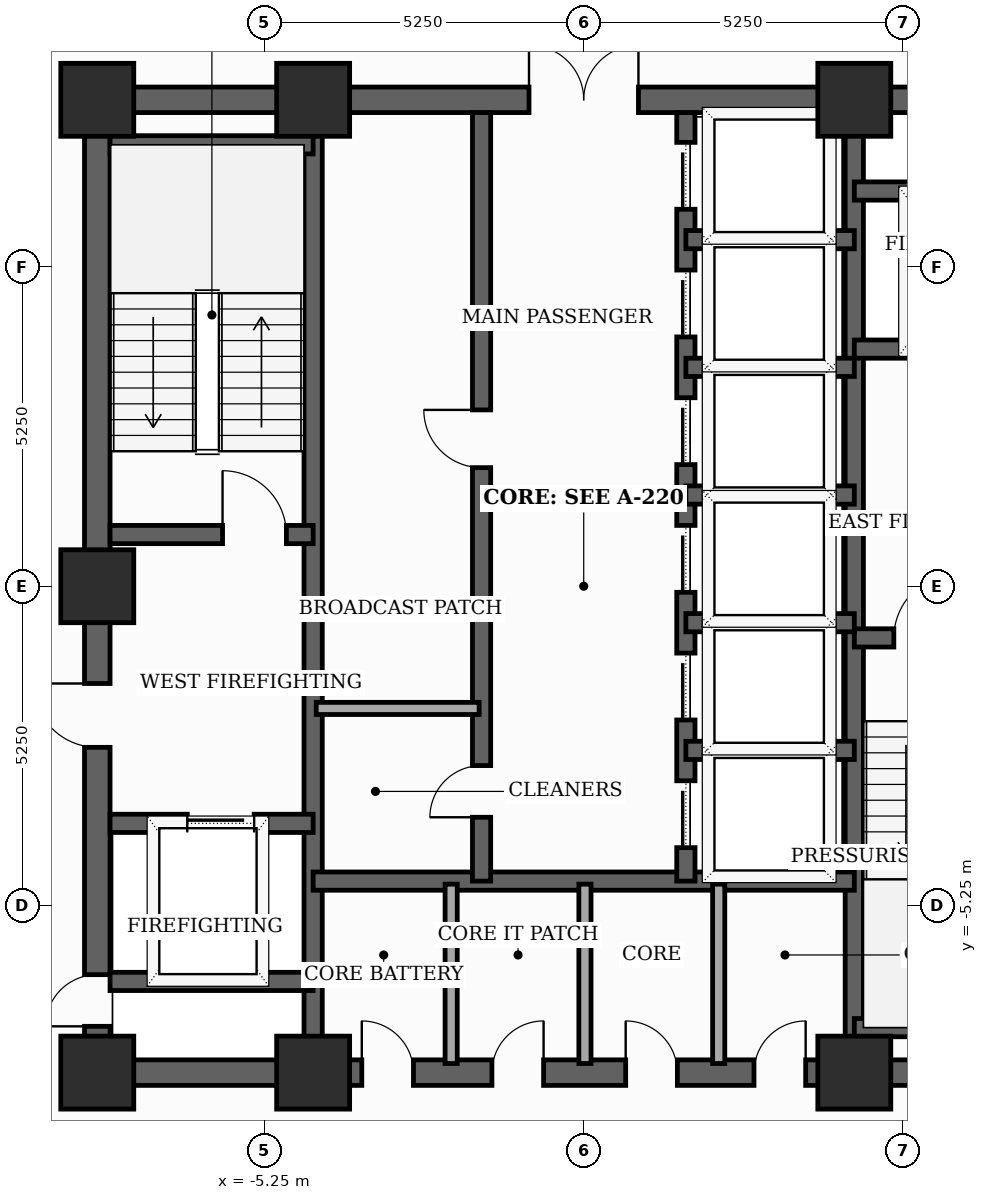
"""IFC4 building model, lengths in metres.
Left out: names, types, materials, properties, quantities, classifications, styles, units other than length and angle.
Written with IfcOpenShell. Run it as: python <this file> out.ifc"""

import sys

from ifc_helpers import new_model, si_unit, direction, frame, frame_2d, origin, origin_2d, place, context, subcontext, project, spatial, rectangle, extrude, element, fill, save


model = new_model("IFC4")
c1 = context("Model", 3, precision=1e-05, world=origin(), true_north=direction((0.0, 1.0)))
c2 = subcontext(c1, "Body", "Model", "MODEL_VIEW")
j1 = project(units=[si_unit("LENGTHUNIT", "METRE"), si_unit("PLANEANGLEUNIT", "RADIAN")], contexts=[c1])
p1 = place(None, origin())
s1 = spatial("IfcSite", under=j1, at=p1, CompositionType="ELEMENT")
p2 = place(p1, origin())
s2 = spatial("IfcBuilding", under=s1, at=p2, CompositionType="ELEMENT")
p3 = place(p2, frame((0.0, 0.0, 206.4)))
s3 = spatial("IfcBuildingStorey", under=s2, at=p3, CompositionType="ELEMENT", Elevation=206.4)
for number, where, z_axis, x_axis in (
    (1, (-8.0, -8.0, 0.0), (0.0, 0.0, 1.0), (1.0, 0.0, 0.0)),
    (2, (-4.45, -8.0, 0.0), (0.0, 0.0, 1.0), (1.0, 0.0, 0.0)),
    (3, (4.45, -8.0, 0.0), (0.0, 0.0, 1.0), (1.0, 0.0, 0.0)),
    (4, (4.45, 8.0, 0.0), (0.0, 0.0, 1.0), (1.0, 0.0, 0.0)),
    (5, (-4.45, 8.0, 0.0), (0.0, 0.0, 1.0), (1.0, 0.0, 0.0)),
    (6, (-8.0, 8.0, 0.0), (0.0, 0.0, 1.0), (1.0, 0.0, 0.0)),
    (7, (-8.0, 0.0, 0.0), (0.0, 0.0, 1.0), (1.0, 0.0, 0.0)),
):
    element("IfcColumn", number, at=place(p3, frame(where, z_axis=z_axis, x_axis=x_axis)), inside=s3, PredefinedType="COLUMN", context=c2, shape_type="SweptSolid", body=[
        extrude(rectangle(XDim=1.2, YDim=1.2, at=origin_2d()), origin(), (0.0, 0.0, 1.0), 3.7),
    ])
p4 = place(p3, frame((-8.0, -8.0, 0.0), z_axis=(0.0, 0.0, 1.0), x_axis=(0.0, 1.0, 0.0)))
e8 = element("IfcWall", 8, at=p4, inside=s3, PredefinedType="SHEAR", context=c2, shape_type="SweptSolid", body=[
    extrude(rectangle(XDim=16.0, YDim=0.42, at=frame_2d((8.0, 0.0))), origin(), (0.0, 0.0, 1.0), 3.5),
])
p5 = place(p4, frame((0.761, 0.0, 0.0)))
e9 = element("IfcOpeningElement", 9, at=p5, cuts=e8, PredefinedType="OPENING", context=c2, shape_type="SweptSolid", body=[
    extrude(rectangle(XDim=0.85, YDim=2.02, at=frame_2d((0.425, 1.01))), frame((0.0, 0.22, 0.0), z_axis=(0.0, -1.0, 0.0), x_axis=(1.0, 0.0, 0.0)), (0.0, 0.0, 1.0), 0.44),
])
p6 = place(p4, frame((5.35, 0.0, 0.0)))
e10 = element("IfcOpeningElement", 10, at=p6, cuts=e8, PredefinedType="OPENING", context=c2, shape_type="SweptSolid", body=[
    extrude(rectangle(XDim=1.05, YDim=2.15, at=frame_2d((0.525, 1.075))), frame((0.0, 0.22, 0.0), z_axis=(0.0, -1.0, 0.0), x_axis=(1.0, 0.0, 0.0)), (0.0, 0.0, 1.0), 0.44),
])
p7 = place(p3, frame((-8.0, -8.0, 0.0), z_axis=(0.0, 0.0, 1.0), x_axis=(1.0, 0.0, 0.0)))
e11 = element("IfcWall", 11, at=p7, inside=s3, PredefinedType="SHEAR", context=c2, shape_type="SweptSolid", body=[
    extrude(rectangle(XDim=16.0, YDim=0.42, at=frame_2d((8.0, 0.0))), origin(), (0.0, 0.0, 1.0), 3.5),
])
p8 = place(p7, frame((4.35, 0.0, 0.0)))
e12 = element("IfcOpeningElement", 12, at=p8, cuts=e11, PredefinedType="OPENING", context=c2, shape_type="SweptSolid", body=[
    extrude(rectangle(XDim=0.85, YDim=2.02, at=frame_2d((0.425, 1.01))), frame((0.0, 0.22, 0.0), z_axis=(0.0, -1.0, 0.0), x_axis=(1.0, 0.0, 0.0)), (0.0, 0.0, 1.0), 0.44),
])
p9 = place(p7, frame((6.49, 0.0, 0.0)))
e13 = element("IfcOpeningElement", 13, at=p9, cuts=e11, PredefinedType="OPENING", context=c2, shape_type="SweptSolid", body=[
    extrude(rectangle(XDim=0.85, YDim=2.02, at=frame_2d((0.425, 1.01))), frame((0.0, 0.22, 0.0), z_axis=(0.0, -1.0, 0.0), x_axis=(1.0, 0.0, 0.0)), (0.0, 0.0, 1.0), 0.44),
])
p10 = place(p7, frame((8.69, 0.0, 0.0)))
e14 = element("IfcOpeningElement", 14, at=p10, cuts=e11, PredefinedType="OPENING", context=c2, shape_type="SweptSolid", body=[
    extrude(rectangle(XDim=0.85, YDim=2.02, at=frame_2d((0.425, 1.01))), frame((0.0, 0.22, 0.0), z_axis=(0.0, -1.0, 0.0), x_axis=(1.0, 0.0, 0.0)), (0.0, 0.0, 1.0), 0.44),
])
p11 = place(p7, frame((10.8, 0.0, 0.0)))
e15 = element("IfcOpeningElement", 15, at=p11, cuts=e11, PredefinedType="OPENING", context=c2, shape_type="SweptSolid", body=[
    extrude(rectangle(XDim=0.85, YDim=2.02, at=frame_2d((0.425, 1.01))), frame((0.0, 0.22, 0.0), z_axis=(0.0, -1.0, 0.0), x_axis=(1.0, 0.0, 0.0)), (0.0, 0.0, 1.0), 0.44),
])
p12 = place(p3, frame((-8.0, 8.0, 0.0), z_axis=(0.0, 0.0, 1.0), x_axis=(1.0, 0.0, 0.0)))
e16 = element("IfcWall", 16, at=p12, inside=s3, PredefinedType="SHEAR", context=c2, shape_type="SweptSolid", body=[
    extrude(rectangle(XDim=16.0, YDim=0.42, at=frame_2d((8.0, 0.0))), origin(), (0.0, 0.0, 1.0), 3.5),
])
p13 = place(p12, frame((7.1, 0.0, 0.0)))
e17 = element("IfcOpeningElement", 17, at=p13, cuts=e16, PredefinedType="OPENING", context=c2, shape_type="SweptSolid", body=[
    extrude(rectangle(XDim=1.8, YDim=2.15, at=frame_2d((0.9, 1.075))), frame((0.0, 0.22, 0.0), z_axis=(0.0, -1.0, 0.0), x_axis=(1.0, 0.0, 0.0)), (0.0, 0.0, 1.0), 0.44),
])
for number, where, z_axis, x_axis in (
    (18, (-4.45, -7.79, 0.0), (0.0, 0.0, 1.0), (0.0, 1.0, 0.0)),
    (19, (4.45, -7.79, 0.0), (0.0, 0.0, 1.0), (0.0, 1.0, 0.0)),
):
    element("IfcWall", number, at=place(p3, frame(where, z_axis=z_axis, x_axis=x_axis)), inside=s3, PredefinedType="SHEAR", context=c2, shape_type="SweptSolid", body=[
        extrude(rectangle(XDim=15.58, YDim=0.3, at=frame_2d((7.79, 0.0))), origin(), (0.0, 0.0, 1.0), 3.5),
    ])
p14 = place(p3, frame((-7.79, 0.85, 0.0), z_axis=(0.0, 0.0, 1.0), x_axis=(1.0, 0.0, 0.0)))
e20 = element("IfcWall", 20, at=p14, inside=s3, PredefinedType="SHEAR", context=c2, shape_type="SweptSolid", body=[
    extrude(rectangle(XDim=3.34, YDim=0.3, at=frame_2d((1.67, 0.0))), origin(), (0.0, 0.0, 1.0), 3.5),
])
p15 = place(p14, frame((1.85, 0.0, 0.0)))
e21 = element("IfcOpeningElement", 21, at=p15, cuts=e20, PredefinedType="OPENING", context=c2, shape_type="SweptSolid", body=[
    extrude(rectangle(XDim=1.05, YDim=2.15, at=frame_2d((0.525, 1.075))), frame((0.0, 0.16, 0.0), z_axis=(0.0, -1.0, 0.0), x_axis=(1.0, 0.0, 0.0)), (0.0, 0.0, 1.0), 0.32),
])
p16 = place(p3, frame((-7.79, 7.26, 0.0), z_axis=(0.0, 0.0, 1.0), x_axis=(1.0, 0.0, 0.0)))
e22 = element("IfcWall", 22, at=p16, inside=s3, PredefinedType="SHEAR", context=c2, shape_type="SweptSolid", body=[
    extrude(rectangle(XDim=3.34, YDim=0.3, at=frame_2d((1.67, 0.0))), origin(), (0.0, 0.0, 1.0), 3.5),
])
p17 = place(p3, frame((4.45, -0.85, 0.0), z_axis=(0.0, 0.0, 1.0), x_axis=(1.0, 0.0, 0.0)))
e23 = element("IfcWall", 23, at=p17, inside=s3, PredefinedType="SHEAR", context=c2, shape_type="SweptSolid", body=[
    extrude(rectangle(XDim=3.34, YDim=0.3, at=frame_2d((1.67, 0.0))), origin(), (0.0, 0.0, 1.0), 3.5),
])
p18 = place(p17, frame((0.65, 0.0, 0.0)))
e24 = element("IfcOpeningElement", 24, at=p18, cuts=e23, PredefinedType="OPENING", context=c2, shape_type="SweptSolid", body=[
    extrude(rectangle(XDim=1.05, YDim=2.15, at=frame_2d((0.525, 1.075))), frame((0.0, 0.16, 0.0), z_axis=(0.0, -1.0, 0.0), x_axis=(1.0, 0.0, 0.0)), (0.0, 0.0, 1.0), 0.32),
])
p19 = place(p3, frame((4.45, -7.26, 0.0), z_axis=(0.0, 0.0, 1.0), x_axis=(1.0, 0.0, 0.0)))
e25 = element("IfcWall", 25, at=p19, inside=s3, PredefinedType="SHEAR", context=c2, shape_type="SweptSolid", body=[
    extrude(rectangle(XDim=3.55, YDim=0.3, at=frame_2d((1.775, 0.0))), origin(), (0.0, 0.0, 1.0), 3.5),
])
p20 = place(p3, frame((-7.79, -3.9, 0.0), z_axis=(0.0, 0.0, 1.0), x_axis=(1.0, 0.0, 0.0)))
e26 = element("IfcWall", 26, at=p20, inside=s3, PredefinedType="SHEAR", context=c2, shape_type="SweptSolid", body=[
    extrude(rectangle(XDim=3.34, YDim=0.3, at=frame_2d((1.67, 0.0))), origin(), (0.0, 0.0, 1.0), 3.5),
])
p21 = place(p20, frame((1.27, 0.0, 0.0)))
e27 = element("IfcOpeningElement", 27, at=p21, cuts=e26, PredefinedType="OPENING", context=c2, shape_type="SweptSolid", body=[
    extrude(rectangle(XDim=1.1, YDim=2.1, at=frame_2d((0.55, 1.05))), frame((0.0, 0.16, 0.0), z_axis=(0.0, -1.0, 0.0), x_axis=(1.0, 0.0, 0.0)), (0.0, 0.0, 1.0), 0.32),
])
p22 = place(p3, frame((-7.79, -6.5, 0.0), z_axis=(0.0, 0.0, 1.0), x_axis=(1.0, 0.0, 0.0)))
e28 = element("IfcWall", 28, at=p22, inside=s3, PredefinedType="SHEAR", context=c2, shape_type="SweptSolid", body=[
    extrude(rectangle(XDim=3.34, YDim=0.3, at=frame_2d((1.67, 0.0))), origin(), (0.0, 0.0, 1.0), 3.5),
])
p23 = place(p3, frame((4.45, 3.9, 0.0), z_axis=(0.0, 0.0, 1.0), x_axis=(1.0, 0.0, 0.0)))
e29 = element("IfcWall", 29, at=p23, inside=s3, PredefinedType="SHEAR", context=c2, shape_type="SweptSolid", body=[
    extrude(rectangle(XDim=3.34, YDim=0.3, at=frame_2d((1.67, 0.0))), origin(), (0.0, 0.0, 1.0), 3.5),
])
p24 = place(p23, frame((1.18, 0.0, 0.0)))
e30 = element("IfcOpeningElement", 30, at=p24, cuts=e29, PredefinedType="OPENING", context=c2, shape_type="SweptSolid", body=[
    extrude(rectangle(XDim=1.1, YDim=2.1, at=frame_2d((0.55, 1.05))), frame((0.0, 0.16, 0.0), z_axis=(0.0, -1.0, 0.0), x_axis=(1.0, 0.0, 0.0)), (0.0, 0.0, 1.0), 0.32),
])
p25 = place(p3, frame((4.45, 6.5, 0.0), z_axis=(0.0, 0.0, 1.0), x_axis=(1.0, 0.0, 0.0)))
e31 = element("IfcWall", 31, at=p25, inside=s3, PredefinedType="SHEAR", context=c2, shape_type="SweptSolid", body=[
    extrude(rectangle(XDim=3.34, YDim=0.3, at=frame_2d((1.67, 0.0))), origin(), (0.0, 0.0, 1.0), 3.5),
])
p26 = place(p3, frame((-4.45, -4.85, 0.0), z_axis=(0.0, 0.0, 1.0), x_axis=(1.0, 0.0, 0.0)))
e32 = element("IfcWall", 32, at=p26, inside=s3, PredefinedType="SHEAR", context=c2, shape_type="SweptSolid", body=[
    extrude(rectangle(XDim=8.9, YDim=0.3, at=frame_2d((4.45, 0.0))), origin(), (0.0, 0.0, 1.0), 3.5),
])
p27 = place(p3, frame((-1.68, -4.85, 0.0), z_axis=(0.0, 0.0, 1.0), x_axis=(0.0, 1.0, 0.0)))
e33 = element("IfcWall", 33, at=p27, inside=s3, PredefinedType="SHEAR", context=c2, shape_type="SweptSolid", body=[
    extrude(rectangle(XDim=12.64, YDim=0.3, at=frame_2d((6.32, 0.0))), origin(), (0.0, 0.0, 1.0), 3.5),
])
p28 = place(p27, frame((1.05, 0.0, 0.0)))
e34 = element("IfcOpeningElement", 34, at=p28, cuts=e33, PredefinedType="OPENING", context=c2, shape_type="SweptSolid", body=[
    extrude(rectangle(XDim=0.85, YDim=2.02, at=frame_2d((0.425, 1.01))), frame((0.0, 0.16, 0.0), z_axis=(0.0, -1.0, 0.0), x_axis=(1.0, 0.0, 0.0)), (0.0, 0.0, 1.0), 0.32),
])
p29 = place(p27, frame((6.8, 0.0, 0.0)))
e35 = element("IfcOpeningElement", 35, at=p29, cuts=e33, PredefinedType="OPENING", context=c2, shape_type="SweptSolid", body=[
    extrude(rectangle(XDim=0.95, YDim=2.1, at=frame_2d((0.475, 1.05))), frame((0.0, 0.16, 0.0), z_axis=(0.0, -1.0, 0.0), x_axis=(1.0, 0.0, 0.0)), (0.0, 0.0, 1.0), 0.32),
])
p30 = place(p3, frame((1.68, -4.85, 0.0), z_axis=(0.0, 0.0, 1.0), x_axis=(0.0, 1.0, 0.0)))
e36 = element("IfcWall", 36, at=p30, inside=s3, PredefinedType="SHEAR", context=c2, shape_type="SweptSolid", body=[
    extrude(rectangle(XDim=12.64, YDim=0.3, at=frame_2d((6.32, 0.0))), origin(), (0.0, 0.0, 1.0), 3.5),
])
p31 = place(p30, frame((0.55, 0.0, 0.0)))
e37 = element("IfcOpeningElement", 37, at=p31, cuts=e36, PredefinedType="OPENING", context=c2, shape_type="SweptSolid", body=[
    extrude(rectangle(XDim=1.1, YDim=2.1, at=frame_2d((0.55, 1.05))), frame((0.0, 0.16, 0.0), z_axis=(0.0, -1.0, 0.0), x_axis=(1.0, 0.0, 0.0)), (0.0, 0.0, 1.0), 0.32),
])
p32 = place(p30, frame((2.65, 0.0, 0.0)))
e38 = element("IfcOpeningElement", 38, at=p32, cuts=e36, PredefinedType="OPENING", context=c2, shape_type="SweptSolid", body=[
    extrude(rectangle(XDim=1.1, YDim=2.1, at=frame_2d((0.55, 1.05))), frame((0.0, 0.16, 0.0), z_axis=(0.0, -1.0, 0.0), x_axis=(1.0, 0.0, 0.0)), (0.0, 0.0, 1.0), 0.32),
])
p33 = place(p30, frame((4.75, 0.0, 0.0)))
e39 = element("IfcOpeningElement", 39, at=p33, cuts=e36, PredefinedType="OPENING", context=c2, shape_type="SweptSolid", body=[
    extrude(rectangle(XDim=1.1, YDim=2.1, at=frame_2d((0.55, 1.05))), frame((0.0, 0.16, 0.0), z_axis=(0.0, -1.0, 0.0), x_axis=(1.0, 0.0, 0.0)), (0.0, 0.0, 1.0), 0.32),
])
p34 = place(p30, frame((6.85, 0.0, 0.0)))
e40 = element("IfcOpeningElement", 40, at=p34, cuts=e36, PredefinedType="OPENING", context=c2, shape_type="SweptSolid", body=[
    extrude(rectangle(XDim=1.1, YDim=2.1, at=frame_2d((0.55, 1.05))), frame((0.0, 0.16, 0.0), z_axis=(0.0, -1.0, 0.0), x_axis=(1.0, 0.0, 0.0)), (0.0, 0.0, 1.0), 0.32),
])
p35 = place(p30, frame((8.95, 0.0, 0.0)))
e41 = element("IfcOpeningElement", 41, at=p35, cuts=e36, PredefinedType="OPENING", context=c2, shape_type="SweptSolid", body=[
    extrude(rectangle(XDim=1.1, YDim=2.1, at=frame_2d((0.55, 1.05))), frame((0.0, 0.16, 0.0), z_axis=(0.0, -1.0, 0.0), x_axis=(1.0, 0.0, 0.0)), (0.0, 0.0, 1.0), 0.32),
])
p36 = place(p30, frame((11.05, 0.0, 0.0)))
e42 = element("IfcOpeningElement", 42, at=p36, cuts=e36, PredefinedType="OPENING", context=c2, shape_type="SweptSolid", body=[
    extrude(rectangle(XDim=1.1, YDim=2.1, at=frame_2d((0.55, 1.05))), frame((0.0, 0.16, 0.0), z_axis=(0.0, -1.0, 0.0), x_axis=(1.0, 0.0, 0.0)), (0.0, 0.0, 1.0), 0.32),
])
for number, where, z_axis, x_axis in (
    (43, (1.68, 1.5, 0.0), (0.0, 0.0, 1.0), (1.0, 0.0, 0.0)),
    (44, (1.68, 3.6, 0.0), (0.0, 0.0, 1.0), (1.0, 0.0, 0.0)),
    (45, (1.68, 5.7, 0.0), (0.0, 0.0, 1.0), (1.0, 0.0, 0.0)),
    (46, (1.68, -2.7, 0.0), (0.0, 0.0, 1.0), (1.0, 0.0, 0.0)),
    (47, (1.68, -0.6, 0.0), (0.0, 0.0, 1.0), (1.0, 0.0, 0.0)),
):
    element("IfcWall", number, at=place(p3, frame(where, z_axis=z_axis, x_axis=x_axis)), inside=s3, PredefinedType="SHEAR", context=c2, shape_type="SweptSolid", body=[
        extrude(rectangle(XDim=2.77, YDim=0.3, at=frame_2d((1.385, 0.0))), origin(), (0.0, 0.0, 1.0), 3.5),
    ])
for number, where, z_axis, x_axis in (
    (48, (-2.18, -7.85, 0.0), (0.0, 0.0, 1.0), (0.0, 1.0, 0.0)),
    (49, (0.02, -7.85, 0.0), (0.0, 0.0, 1.0), (0.0, 1.0, 0.0)),
    (50, (2.22, -7.85, 0.0), (0.0, 0.0, 1.0), (0.0, 1.0, 0.0)),
):
    element("IfcWall", number, at=place(p3, frame(where, z_axis=z_axis, x_axis=x_axis)), inside=s3, PredefinedType="SOLIDWALL", context=c2, shape_type="SweptSolid", body=[
        extrude(rectangle(XDim=2.95, YDim=0.2, at=frame_2d((1.475, 0.0))), origin(), (0.0, 0.0, 1.0), 2.885),
    ])
p37 = place(p3, frame((-4.4, -2.01, 0.0), z_axis=(0.0, 0.0, 1.0), x_axis=(1.0, 0.0, 0.0)))
e51 = element("IfcWall", 51, at=p37, inside=s3, PredefinedType="SOLIDWALL", context=c2, shape_type="SweptSolid", body=[
    extrude(rectangle(XDim=2.68, YDim=0.2, at=frame_2d((1.34, 0.0))), origin(), (0.0, 0.0, 1.0), 3.5),
])
p38 = place(p5, origin())
e52 = element("IfcDoor", 52, at=p38, inside=s3, OperationType="SINGLE_SWING_LEFT", PredefinedType="TRAPDOOR", context=c2, shape_type="SweptSolid", body=[
    extrude(rectangle(XDim=0.85, YDim=2.02, at=frame_2d((0.425, 1.01))), frame((0.0, 0.025, 0.0), z_axis=(0.0, -1.0, 0.0), x_axis=(1.0, 0.0, 0.0)), (0.0, 0.0, 1.0), 0.05),
])
fill(e9, e52)
p39 = place(p6, origin())
e53 = element("IfcDoor", 53, at=p39, inside=s3, OperationType="SINGLE_SWING_RIGHT", PredefinedType="DOOR", context=c2, shape_type="SweptSolid", body=[
    extrude(rectangle(XDim=1.05, YDim=2.15, at=frame_2d((0.525, 1.075))), frame((0.0, 0.025, 0.0), z_axis=(0.0, -1.0, 0.0), x_axis=(1.0, 0.0, 0.0)), (0.0, 0.0, 1.0), 0.05),
])
fill(e10, e53)
p40 = place(p8, origin())
e54 = element("IfcDoor", 54, at=p40, inside=s3, OperationType="SINGLE_SWING_LEFT", PredefinedType="TRAPDOOR", context=c2, shape_type="SweptSolid", body=[
    extrude(rectangle(XDim=0.85, YDim=2.02, at=frame_2d((0.425, 1.01))), frame((0.0, 0.025, 0.0), z_axis=(0.0, -1.0, 0.0), x_axis=(1.0, 0.0, 0.0)), (0.0, 0.0, 1.0), 0.05),
])
fill(e12, e54)
p41 = place(p9, origin())
e55 = element("IfcDoor", 55, at=p41, inside=s3, OperationType="SINGLE_SWING_RIGHT", PredefinedType="TRAPDOOR", context=c2, shape_type="SweptSolid", body=[
    extrude(rectangle(XDim=0.85, YDim=2.02, at=frame_2d((0.425, 1.01))), frame((0.0, 0.025, 0.0), z_axis=(0.0, -1.0, 0.0), x_axis=(1.0, 0.0, 0.0)), (0.0, 0.0, 1.0), 0.05),
])
fill(e13, e55)
p42 = place(p10, origin())
e56 = element("IfcDoor", 56, at=p42, inside=s3, OperationType="SINGLE_SWING_LEFT", PredefinedType="TRAPDOOR", context=c2, shape_type="SweptSolid", body=[
    extrude(rectangle(XDim=0.85, YDim=2.02, at=frame_2d((0.425, 1.01))), frame((0.0, 0.025, 0.0), z_axis=(0.0, -1.0, 0.0), x_axis=(1.0, 0.0, 0.0)), (0.0, 0.0, 1.0), 0.05),
])
fill(e14, e56)
p43 = place(p11, origin())
e57 = element("IfcDoor", 57, at=p43, inside=s3, OperationType="SINGLE_SWING_RIGHT", PredefinedType="TRAPDOOR", context=c2, shape_type="SweptSolid", body=[
    extrude(rectangle(XDim=0.85, YDim=2.02, at=frame_2d((0.425, 1.01))), frame((0.0, 0.025, 0.0), z_axis=(0.0, -1.0, 0.0), x_axis=(1.0, 0.0, 0.0)), (0.0, 0.0, 1.0), 0.05),
])
fill(e15, e57)
p44 = place(p13, origin())
e58 = element("IfcDoor", 58, at=p44, inside=s3, OperationType="DOUBLE_DOOR_SINGLE_SWING", PredefinedType="DOOR", context=c2, shape_type="SweptSolid", body=[
    extrude(rectangle(XDim=1.8, YDim=2.15, at=frame_2d((0.9, 1.075))), frame((0.0, 0.025, 0.0), z_axis=(0.0, -1.0, 0.0), x_axis=(1.0, 0.0, 0.0)), (0.0, 0.0, 1.0), 0.05),
])
fill(e17, e58)
p45 = place(p15, origin())
e59 = element("IfcDoor", 59, at=p45, inside=s3, OperationType="SINGLE_SWING_LEFT", PredefinedType="DOOR", context=c2, shape_type="SweptSolid", body=[
    extrude(rectangle(XDim=1.05, YDim=2.15, at=frame_2d((0.525, 1.075))), frame((0.0, 0.025, 0.0), z_axis=(0.0, -1.0, 0.0), x_axis=(1.0, 0.0, 0.0)), (0.0, 0.0, 1.0), 0.05),
])
fill(e21, e59)
p46 = place(p18, origin())
e60 = element("IfcDoor", 60, at=p46, inside=s3, OperationType="SINGLE_SWING_RIGHT", PredefinedType="DOOR", context=c2, shape_type="SweptSolid", body=[
    extrude(rectangle(XDim=1.05, YDim=2.15, at=frame_2d((0.525, 1.075))), frame((0.0, 0.025, 0.0), z_axis=(0.0, -1.0, 0.0), x_axis=(1.0, 0.0, 0.0)), (0.0, 0.0, 1.0), 0.05),
])
fill(e24, e60)
p47 = place(p21, origin())
e61 = element("IfcDoor", 61, at=p47, inside=s3, OperationType="SLIDING_TO_LEFT", PredefinedType="DOOR", context=c2, shape_type="SweptSolid", body=[
    extrude(rectangle(XDim=1.1, YDim=2.1, at=frame_2d((0.55, 1.05))), frame((0.0, 0.025, 0.0), z_axis=(0.0, -1.0, 0.0), x_axis=(1.0, 0.0, 0.0)), (0.0, 0.0, 1.0), 0.05),
])
fill(e27, e61)
p48 = place(p28, origin())
e62 = element("IfcDoor", 62, at=p48, inside=s3, OperationType="SINGLE_SWING_LEFT", PredefinedType="TRAPDOOR", context=c2, shape_type="SweptSolid", body=[
    extrude(rectangle(XDim=0.85, YDim=2.02, at=frame_2d((0.425, 1.01))), frame((0.0, 0.025, 0.0), z_axis=(0.0, -1.0, 0.0), x_axis=(1.0, 0.0, 0.0)), (0.0, 0.0, 1.0), 0.05),
])
fill(e34, e62)
p49 = place(p29, origin())
e63 = element("IfcDoor", 63, at=p49, inside=s3, OperationType="SINGLE_SWING_RIGHT", PredefinedType="DOOR", context=c2, shape_type="SweptSolid", body=[
    extrude(rectangle(XDim=0.95, YDim=2.1, at=frame_2d((0.475, 1.05))), frame((0.0, 0.025, 0.0), z_axis=(0.0, -1.0, 0.0), x_axis=(1.0, 0.0, 0.0)), (0.0, 0.0, 1.0), 0.05),
])
fill(e35, e63)
p50 = place(p31, origin())
e64 = element("IfcDoor", 64, at=p50, inside=s3, OperationType="SLIDING_TO_LEFT", PredefinedType="DOOR", context=c2, shape_type="SweptSolid", body=[
    extrude(rectangle(XDim=1.1, YDim=2.1, at=frame_2d((0.55, 1.05))), frame((0.0, 0.025, 0.0), z_axis=(0.0, -1.0, 0.0), x_axis=(1.0, 0.0, 0.0)), (0.0, 0.0, 1.0), 0.05),
])
fill(e37, e64)
p51 = place(p32, origin())
e65 = element("IfcDoor", 65, at=p51, inside=s3, OperationType="SLIDING_TO_LEFT", PredefinedType="DOOR", context=c2, shape_type="SweptSolid", body=[
    extrude(rectangle(XDim=1.1, YDim=2.1, at=frame_2d((0.55, 1.05))), frame((0.0, 0.025, 0.0), z_axis=(0.0, -1.0, 0.0), x_axis=(1.0, 0.0, 0.0)), (0.0, 0.0, 1.0), 0.05),
])
fill(e38, e65)
p52 = place(p33, origin())
e66 = element("IfcDoor", 66, at=p52, inside=s3, OperationType="SLIDING_TO_LEFT", PredefinedType="DOOR", context=c2, shape_type="SweptSolid", body=[
    extrude(rectangle(XDim=1.1, YDim=2.1, at=frame_2d((0.55, 1.05))), frame((0.0, 0.025, 0.0), z_axis=(0.0, -1.0, 0.0), x_axis=(1.0, 0.0, 0.0)), (0.0, 0.0, 1.0), 0.05),
])
fill(e39, e66)
p53 = place(p34, origin())
e67 = element("IfcDoor", 67, at=p53, inside=s3, OperationType="SLIDING_TO_LEFT", PredefinedType="DOOR", context=c2, shape_type="SweptSolid", body=[
    extrude(rectangle(XDim=1.1, YDim=2.1, at=frame_2d((0.55, 1.05))), frame((0.0, 0.025, 0.0), z_axis=(0.0, -1.0, 0.0), x_axis=(1.0, 0.0, 0.0)), (0.0, 0.0, 1.0), 0.05),
])
fill(e40, e67)
p54 = place(p35, origin())
e68 = element("IfcDoor", 68, at=p54, inside=s3, OperationType="SLIDING_TO_LEFT", PredefinedType="DOOR", context=c2, shape_type="SweptSolid", body=[
    extrude(rectangle(XDim=1.1, YDim=2.1, at=frame_2d((0.55, 1.05))), frame((0.0, 0.025, 0.0), z_axis=(0.0, -1.0, 0.0), x_axis=(1.0, 0.0, 0.0)), (0.0, 0.0, 1.0), 0.05),
])
fill(e41, e68)
p55 = place(p36, origin())
e69 = element("IfcDoor", 69, at=p55, inside=s3, OperationType="SLIDING_TO_LEFT", PredefinedType="DOOR", context=c2, shape_type="SweptSolid", body=[
    extrude(rectangle(XDim=1.1, YDim=2.1, at=frame_2d((0.55, 1.05))), frame((0.0, 0.025, 0.0), z_axis=(0.0, -1.0, 0.0), x_axis=(1.0, 0.0, 0.0)), (0.0, 0.0, 1.0), 0.05),
])
fill(e42, e69)
save(model, sys.argv[1])
